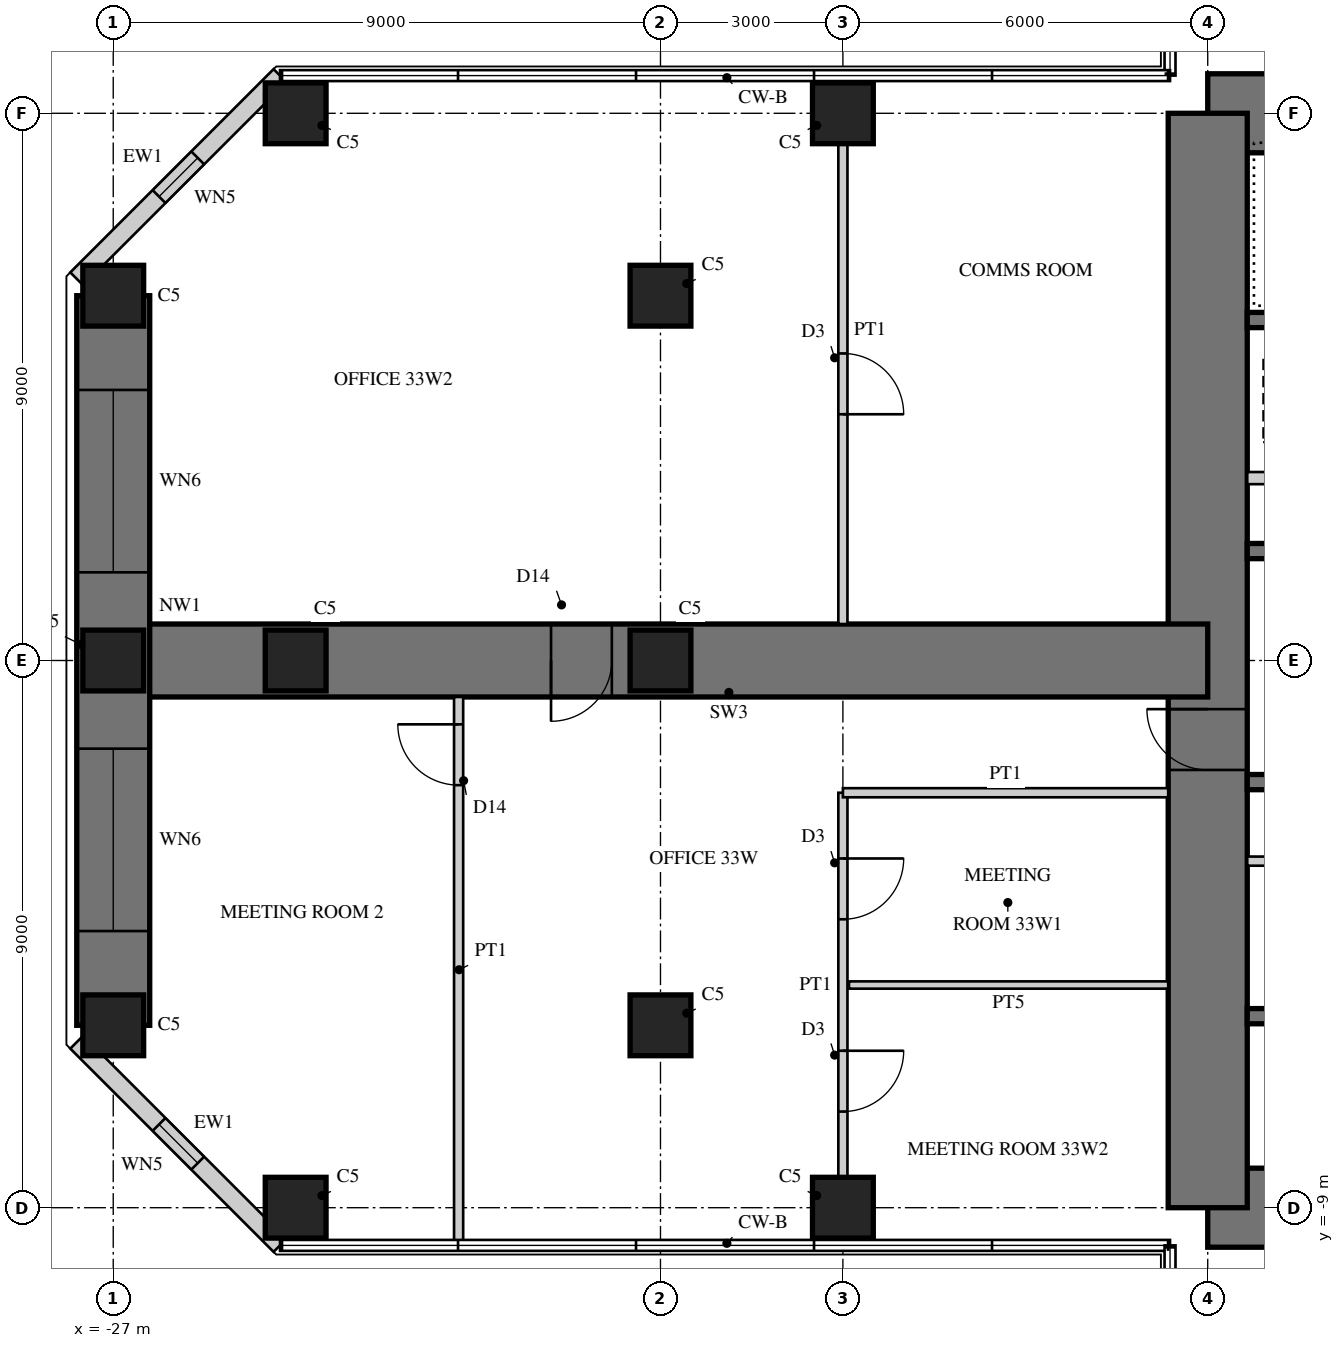
"""IFC4 building model, lengths in metres.
Left out: names, types, materials, properties, quantities, classifications, styles, units other than length and angle.
Written with IfcOpenShell. Run it as: python <this file> out.ifc"""

import sys

from ifc_helpers import new_model, si_unit, direction, frame, frame_2d, origin, origin_2d, place, context, subcontext, project, spatial, rectangle, hollow_rectangle, extrude, element, fill, save


model = new_model("IFC4")
c1 = context("Model", 3, precision=1e-05, world=origin(), true_north=direction((0.0, 1.0)))
c2 = subcontext(c1, "Body", "Model", "MODEL_VIEW")
j1 = project(units=[si_unit("LENGTHUNIT", "METRE"), si_unit("PLANEANGLEUNIT", "RADIAN")], contexts=[c1])
p1 = place(None, origin())
s1 = spatial("IfcSite", under=j1, at=p1, CompositionType="ELEMENT")
p2 = place(p1, origin())
s2 = spatial("IfcBuilding", under=s1, at=p2, CompositionType="ELEMENT")
p3 = place(p2, frame((0.0, 0.0, 136.5)))
s3 = spatial("IfcBuildingStorey", under=s2, at=p3, CompositionType="ELEMENT", Elevation=136.5)
p4 = place(p3, frame((9.0, 9.0, 0.0), z_axis=(0.0, 0.0, 1.0), x_axis=(-1.0, 0.0, 0.0)))
e1 = element("IfcWall", 1, at=p4, inside=s3, PredefinedType="SHEAR", context=c2, shape_type="SweptSolid", body=[
    extrude(rectangle(XDim=18.0, YDim=1.3, at=frame_2d((9.0, 0.0))), origin(), (0.0, 0.0, 1.0), 4.0),
])
p5 = place(p4, frame((9.8, 0.0, 0.0)))
e2 = element("IfcOpeningElement", 2, at=p5, cuts=e1, PredefinedType="OPENING", context=c2, shape_type="SweptSolid", body=[
    extrude(rectangle(XDim=1.0, YDim=2.4, at=frame_2d((0.5, 1.2))), frame((0.0, 0.66, 0.0), z_axis=(0.0, -1.0, 0.0), x_axis=(1.0, 0.0, 0.0)), (0.0, 0.0, 1.0), 1.32),
])
p6 = place(p3, frame((-9.0, -9.0, 0.0), z_axis=(0.0, 0.0, 1.0), x_axis=(1.0, 0.0, 0.0)))
e3 = element("IfcWall", 3, at=p6, inside=s3, PredefinedType="SHEAR", context=c2, shape_type="SweptSolid", body=[
    extrude(rectangle(XDim=18.0, YDim=1.3, at=frame_2d((9.0, 0.0))), origin(), (0.0, 0.0, 1.0), 4.0),
])
p7 = place(p6, frame((9.8, 0.0, 0.0)))
e4 = element("IfcOpeningElement", 4, at=p7, cuts=e3, PredefinedType="OPENING", context=c2, shape_type="SweptSolid", body=[
    extrude(rectangle(XDim=1.0, YDim=2.4, at=frame_2d((0.5, 1.2))), frame((0.0, 0.66, 0.0), z_axis=(0.0, -1.0, 0.0), x_axis=(1.0, 0.0, 0.0)), (0.0, 0.0, 1.0), 1.32),
])
p8 = place(p3, frame((-9.0, 9.0, 0.0), z_axis=(0.0, 0.0, 1.0), x_axis=(0.0, -1.0, 0.0)))
e5 = element("IfcWall", 5, at=p8, inside=s3, PredefinedType="SHEAR", context=c2, shape_type="SweptSolid", body=[
    extrude(rectangle(XDim=18.0, YDim=1.3, at=frame_2d((9.0, 0.0))), origin(), (0.0, 0.0, 1.0), 4.0),
])
p9 = place(p8, frame((9.8, 0.0, 0.0)))
e6 = element("IfcOpeningElement", 6, at=p9, cuts=e5, PredefinedType="OPENING", context=c2, shape_type="SweptSolid", body=[
    extrude(rectangle(XDim=1.0, YDim=2.4, at=frame_2d((0.5, 1.2))), frame((0.0, 0.66, 0.0), z_axis=(0.0, -1.0, 0.0), x_axis=(1.0, 0.0, 0.0)), (0.0, 0.0, 1.0), 1.32),
])
p10 = place(p3, frame((-2.125, 1.8, 0.0), z_axis=(0.0, 0.0, 1.0), x_axis=(-1.0, 0.0, 0.0)))
e7 = element("IfcWall", 7, at=p10, inside=s3, PredefinedType="SHEAR", context=c2, shape_type="SweptSolid", body=[
    extrude(rectangle(XDim=6.225, YDim=0.25, at=frame_2d((3.113, 0.0))), origin(), (0.0, 0.0, 1.0), 4.0),
])
p11 = place(p3, frame((-2.125, 5.6, 0.0), z_axis=(0.0, 0.0, 1.0), x_axis=(-1.0, 0.0, 0.0)))
e8 = element("IfcWall", 8, at=p11, inside=s3, PredefinedType="SHEAR", context=c2, shape_type="SweptSolid", body=[
    extrude(rectangle(XDim=6.225, YDim=0.25, at=frame_2d((3.113, 0.0))), origin(), (0.0, 0.0, 1.0), 4.0),
])
p12 = place(p11, frame((0.175, 0.0, 0.0)))
e9 = element("IfcOpeningElement", 9, at=p12, cuts=e8, PredefinedType="OPENING", context=c2, shape_type="SweptSolid", body=[
    extrude(rectangle(XDim=1.0, YDim=2.1, at=frame_2d((0.5, 1.05))), frame((0.0, 0.135, 0.0), z_axis=(0.0, -1.0, 0.0), x_axis=(1.0, 0.0, 0.0)), (0.0, 0.0, 1.0), 0.27),
])
p13 = place(p3, frame((-5.725, 3.0, 0.0), z_axis=(0.0, 0.0, 1.0), x_axis=(-1.0, 0.0, 0.0)))
e10 = element("IfcWall", 10, at=p13, inside=s3, PredefinedType="PARTITIONING", context=c2, shape_type="SweptSolid", body=[
    extrude(rectangle(XDim=2.625, YDim=0.2, at=frame_2d((1.312, 0.0))), origin(), (0.0, 0.0, 1.0), 4.0),
])
for number, where, z_axis, x_axis in (
    (11, (-1.925, -2.0, 0.0), (0.0, 0.0, 1.0), (-1.0, 0.0, 0.0)),
    (12, (-1.925, -5.85, 0.0), (0.0, 0.0, 1.0), (-1.0, 0.0, 0.0)),
):
    element("IfcWall", number, at=place(p3, frame(where, z_axis=z_axis, x_axis=x_axis)), inside=s3, PredefinedType="SHEAR", context=c2, shape_type="SweptSolid", body=[
        extrude(rectangle(XDim=6.425, YDim=0.25, at=frame_2d((3.212, 0.0))), origin(), (0.0, 0.0, 1.0), 4.0),
    ])
p14 = place(p3, frame((-1.925, -3.3, 0.0), z_axis=(0.0, 0.0, 1.0), x_axis=(-1.0, 0.0, 0.0)))
e13 = element("IfcWall", 13, at=p14, inside=s3, PredefinedType="PARTITIONING", context=c2, shape_type="SweptSolid", body=[
    extrude(rectangle(XDim=6.425, YDim=0.15, at=frame_2d((3.212, 0.0))), origin(), (0.0, 0.0, 1.0), 4.0),
])
p15 = place(p14, frame((0.075, 0.0, 0.0)))
e14 = element("IfcOpeningElement", 14, at=p15, cuts=e13, PredefinedType="OPENING", context=c2, shape_type="SweptSolid", body=[
    extrude(rectangle(XDim=0.8, YDim=2.1, at=frame_2d((0.4, 1.05))), frame((0.0, 0.085, 0.0), z_axis=(0.0, -1.0, 0.0), x_axis=(1.0, 0.0, 0.0)), (0.0, 0.0, 1.0), 0.17),
])
p16 = place(p14, frame((3.675, 0.0, 0.0)))
e15 = element("IfcOpeningElement", 15, at=p16, cuts=e13, PredefinedType="OPENING", context=c2, shape_type="SweptSolid", body=[
    extrude(rectangle(XDim=0.8, YDim=2.1, at=frame_2d((0.4, 1.05))), frame((0.0, 0.085, 0.0), z_axis=(0.0, -1.0, 0.0), x_axis=(1.0, 0.0, 0.0)), (0.0, 0.0, 1.0), 0.17),
])
p17 = place(p3, frame((-9.0, 0.0, 0.0), z_axis=(0.0, 0.0, 1.0), x_axis=(-1.0, 0.0, 0.0)))
e16 = element("IfcWall", 16, at=p17, inside=s3, PredefinedType="SHEAR", context=c2, shape_type="SweptSolid", body=[
    extrude(rectangle(XDim=18.0, YDim=1.2, at=frame_2d((9.0, 0.0))), origin(), (0.0, 0.0, 1.0), 4.0),
])
p18 = place(p17, frame((9.8, 0.0, 0.0)))
e17 = element("IfcOpeningElement", 17, at=p18, cuts=e16, PredefinedType="OPENING", context=c2, shape_type="SweptSolid", body=[
    extrude(rectangle(XDim=1.0, YDim=2.2, at=frame_2d((0.5, 1.1))), frame((0.0, 0.61, 0.0), z_axis=(0.0, -1.0, 0.0), x_axis=(1.0, 0.0, 0.0)), (0.0, 0.0, 1.0), 1.22),
])
p19 = place(p3, frame((-27.0, 6.0, 0.0), z_axis=(0.0, 0.0, 1.0), x_axis=(0.0, -1.0, 0.0)))
e18 = element("IfcWall", 18, at=p19, inside=s3, PredefinedType="SHEAR", context=c2, shape_type="SweptSolid", body=[
    extrude(rectangle(XDim=12.0, YDim=1.2, at=frame_2d((6.0, 0.0))), origin(), (0.0, 0.0, 1.0), 4.0),
])
p20 = place(p19, frame((1.55, 0.0, 0.6)))
e19 = element("IfcOpeningElement", 19, at=p20, cuts=e18, PredefinedType="OPENING", context=c2, shape_type="SweptSolid", body=[
    extrude(rectangle(XDim=3.0, YDim=2.4, at=frame_2d((1.5, 1.2))), frame((0.0, 0.61, 0.0), z_axis=(0.0, -1.0, 0.0), x_axis=(1.0, 0.0, 0.0)), (0.0, 0.0, 1.0), 1.22),
])
p21 = place(p19, frame((7.45, 0.0, 0.6)))
e20 = element("IfcOpeningElement", 20, at=p21, cuts=e18, PredefinedType="OPENING", context=c2, shape_type="SweptSolid", body=[
    extrude(rectangle(XDim=3.0, YDim=2.4, at=frame_2d((1.5, 1.2))), frame((0.0, 0.61, 0.0), z_axis=(0.0, -1.0, 0.0), x_axis=(1.0, 0.0, 0.0)), (0.0, 0.0, 1.0), 1.22),
])
for number, where, z_axis, x_axis in (
    (21, (-15.0, 9.0, 0.0), (0.0, 0.0, 1.0), (1.0, 0.0, 0.0)),
    (22, (-24.0, 9.0, 0.0), (0.0, 0.0, 1.0), (1.0, 0.0, 0.0)),
    (23, (-15.0, -9.0, 0.0), (0.0, 0.0, 1.0), (1.0, 0.0, 0.0)),
    (24, (-24.0, -9.0, 0.0), (0.0, 0.0, 1.0), (1.0, 0.0, 0.0)),
    (25, (-27.0, 6.0, 0.0), (0.0, 0.0, 1.0), (1.0, 0.0, 0.0)),
    (26, (-27.0, 0.0, 0.0), (0.0, 0.0, 1.0), (1.0, 0.0, 0.0)),
    (27, (-27.0, -6.0, 0.0), (0.0, 0.0, 1.0), (1.0, 0.0, 0.0)),
    (28, (-18.0, 6.0, 0.0), (0.0, 0.0, 1.0), (1.0, 0.0, 0.0)),
    (29, (-18.0, 0.0, 0.0), (0.0, 0.0, 1.0), (1.0, 0.0, 0.0)),
    (30, (-18.0, -6.0, 0.0), (0.0, 0.0, 1.0), (1.0, 0.0, 0.0)),
    (31, (-24.0, 0.0, 0.0), (0.0, 0.0, 1.0), (1.0, 0.0, 0.0)),
):
    element("IfcColumn", number, at=place(p3, frame(where, z_axis=z_axis, x_axis=x_axis)), inside=s3, PredefinedType="COLUMN", context=c2, shape_type="SweptSolid", body=[
        extrude(rectangle(XDim=1.0, YDim=1.0, at=origin_2d()), origin(), (0.0, 0.0, 1.0), 4.0),
    ])
p22 = place(p3, frame((-24.257, 9.62, 0.0), z_axis=(0.0, 0.0, 1.0), x_axis=(-0.707106781187, -0.707106781187, 0.0)))
e32 = element("IfcWall", 32, at=p22, inside=s3, PredefinedType="SOLIDWALL", context=c2, shape_type="SweptSolid", body=[
    extrude(rectangle(XDim=4.728, YDim=0.3, at=frame_2d((2.364, 0.0))), origin(), (0.0, 0.0, 1.0), 3.8),
])
p23 = place(p22, frame((1.914, 0.0, 0.3)))
e33 = element("IfcOpeningElement", 33, at=p23, cuts=e32, PredefinedType="OPENING", context=c2, shape_type="SweptSolid", body=[
    extrude(rectangle(XDim=0.9, YDim=2.4, at=frame_2d((0.45, 1.2))), frame((0.0, 0.16, 0.0), z_axis=(0.0, -1.0, 0.0), x_axis=(1.0, 0.0, 0.0)), (0.0, 0.0, 1.0), 0.32),
])
p24 = place(p3, frame((-27.6, -6.277, 0.0), z_axis=(0.0, 0.0, 1.0), x_axis=(0.707106781187, -0.707106781187, 0.0)))
e34 = element("IfcWall", 34, at=p24, inside=s3, PredefinedType="SOLIDWALL", context=c2, shape_type="SweptSolid", body=[
    extrude(rectangle(XDim=4.728, YDim=0.3, at=frame_2d((2.364, 0.0))), origin(), (0.0, 0.0, 1.0), 3.8),
])
p25 = place(p24, frame((1.914, 0.0, 0.3)))
e35 = element("IfcOpeningElement", 35, at=p25, cuts=e34, PredefinedType="OPENING", context=c2, shape_type="SweptSolid", body=[
    extrude(rectangle(XDim=0.9, YDim=2.4, at=frame_2d((0.45, 1.2))), frame((0.0, 0.16, 0.0), z_axis=(0.0, -1.0, 0.0), x_axis=(1.0, 0.0, 0.0)), (0.0, 0.0, 1.0), 0.32),
])
p26 = place(p3, frame((-15.0, -2.175, 0.0), z_axis=(0.0, 0.0, 1.0), x_axis=(0.0, -1.0, 0.0)))
e36 = element("IfcWall", 36, at=p26, inside=s3, PredefinedType="PARTITIONING", context=c2, shape_type="SweptSolid", body=[
    extrude(rectangle(XDim=6.325, YDim=0.15, at=frame_2d((3.163, 0.0))), origin(), (0.0, 0.0, 1.0), 3.0),
])
p27 = place(p26, frame((1.081, 0.0, 0.0)))
e37 = element("IfcOpeningElement", 37, at=p27, cuts=e36, PredefinedType="OPENING", context=c2, shape_type="SweptSolid", body=[
    extrude(rectangle(XDim=1.0, YDim=2.1, at=frame_2d((0.5, 1.05))), frame((0.0, 0.085, 0.0), z_axis=(0.0, -1.0, 0.0), x_axis=(1.0, 0.0, 0.0)), (0.0, 0.0, 1.0), 0.17),
])
p28 = place(p26, frame((4.244, 0.0, 0.0)))
e38 = element("IfcOpeningElement", 38, at=p28, cuts=e36, PredefinedType="OPENING", context=c2, shape_type="SweptSolid", body=[
    extrude(rectangle(XDim=1.0, YDim=2.1, at=frame_2d((0.5, 1.05))), frame((0.0, 0.085, 0.0), z_axis=(0.0, -1.0, 0.0), x_axis=(1.0, 0.0, 0.0)), (0.0, 0.0, 1.0), 0.17),
])
p29 = place(p3, frame((-9.65, -2.175, 0.0), z_axis=(0.0, 0.0, 1.0), x_axis=(-1.0, 0.0, 0.0)))
e39 = element("IfcWall", 39, at=p29, inside=s3, PredefinedType="PARTITIONING", context=c2, shape_type="SweptSolid", body=[
    extrude(rectangle(XDim=5.35, YDim=0.15, at=frame_2d((2.675, 0.0))), origin(), (0.0, 0.0, 1.0), 3.8),
])
p30 = place(p3, frame((-9.65, -5.337, 0.0), z_axis=(0.0, 0.0, 1.0), x_axis=(-1.0, 0.0, 0.0)))
e40 = element("IfcWall", 40, at=p30, inside=s3, PredefinedType="PLUMBINGWALL", context=c2, shape_type="SweptSolid", body=[
    extrude(rectangle(XDim=5.25, YDim=0.12, at=frame_2d((2.625, 0.0))), origin(), (0.0, 0.0, 1.0), 3.8),
])
p31 = place(p3, frame((-15.0, 8.5, 0.0), z_axis=(0.0, 0.0, 1.0), x_axis=(0.0, -1.0, 0.0)))
e41 = element("IfcWall", 41, at=p31, inside=s3, PredefinedType="PARTITIONING", context=c2, shape_type="SweptSolid", body=[
    extrude(rectangle(XDim=7.9, YDim=0.15, at=frame_2d((3.95, 0.0))), origin(), (0.0, 0.0, 1.0), 3.0),
])
p32 = place(p31, frame((3.45, 0.0, 0.0)))
e42 = element("IfcOpeningElement", 42, at=p32, cuts=e41, PredefinedType="OPENING", context=c2, shape_type="SweptSolid", body=[
    extrude(rectangle(XDim=1.0, YDim=2.1, at=frame_2d((0.5, 1.05))), frame((0.0, 0.085, 0.0), z_axis=(0.0, -1.0, 0.0), x_axis=(1.0, 0.0, 0.0)), (0.0, 0.0, 1.0), 0.17),
])
p33 = place(p3, frame((-21.32, -0.6, 0.0), z_axis=(0.0, 0.0, 1.0), x_axis=(0.0, -1.0, 0.0)))
e43 = element("IfcWall", 43, at=p33, inside=s3, PredefinedType="PARTITIONING", context=c2, shape_type="SweptSolid", body=[
    extrude(rectangle(XDim=8.98, YDim=0.15, at=frame_2d((4.49, 0.0))), origin(), (0.0, 0.0, 1.0), 3.8),
])
p34 = place(p33, frame((0.45, 0.0, 0.0)))
e44 = element("IfcOpeningElement", 44, at=p34, cuts=e43, PredefinedType="OPENING", context=c2, shape_type="SweptSolid", body=[
    extrude(rectangle(XDim=1.0, YDim=2.2, at=frame_2d((0.5, 1.1))), frame((0.0, 0.085, 0.0), z_axis=(0.0, -1.0, 0.0), x_axis=(1.0, 0.0, 0.0)), (0.0, 0.0, 1.0), 0.17),
])
p35 = place(p23, origin())
e45 = element("IfcWindow", 45, at=p35, inside=s3, PartitioningType="SINGLE_PANEL", PredefinedType="WINDOW", context=c2, shape_type="SweptSolid", body=[
    extrude(hollow_rectangle(XDim=0.9, YDim=2.4, WallThickness=0.06, at=frame_2d((0.45, 1.2))), frame((0.0, 0.03, 0.0), z_axis=(0.0, -1.0, 0.0), x_axis=(1.0, 0.0, 0.0)), (0.0, 0.0, 1.0), 0.06),
    extrude(rectangle(XDim=0.779, YDim=2.279, at=frame_2d((0.45, 1.2))), frame((0.0, 0.03, 0.0), z_axis=(0.0, -1.0, 0.0), x_axis=(1.0, 0.0, 0.0)), (0.0, 0.0, 1.0), 0.06),
])
fill(e33, e45)
p36 = place(p20, origin())
e46 = element("IfcWindow", 46, at=p36, inside=s3, PartitioningType="SINGLE_PANEL", PredefinedType="WINDOW", context=c2, shape_type="SweptSolid", body=[
    extrude(hollow_rectangle(XDim=3.0, YDim=2.4, WallThickness=0.06, at=frame_2d((1.5, 1.2))), frame((0.0, 0.03, 0.0), z_axis=(0.0, -1.0, 0.0), x_axis=(1.0, 0.0, 0.0)), (0.0, 0.0, 1.0), 0.06),
    extrude(rectangle(XDim=2.879, YDim=2.279, at=frame_2d((1.5, 1.2))), frame((0.0, 0.03, 0.0), z_axis=(0.0, -1.0, 0.0), x_axis=(1.0, 0.0, 0.0)), (0.0, 0.0, 1.0), 0.06),
])
fill(e19, e46)
p37 = place(p21, origin())
e47 = element("IfcWindow", 47, at=p37, inside=s3, PartitioningType="SINGLE_PANEL", PredefinedType="WINDOW", context=c2, shape_type="SweptSolid", body=[
    extrude(hollow_rectangle(XDim=3.0, YDim=2.4, WallThickness=0.06, at=frame_2d((1.5, 1.2))), frame((0.0, 0.03, 0.0), z_axis=(0.0, -1.0, 0.0), x_axis=(1.0, 0.0, 0.0)), (0.0, 0.0, 1.0), 0.06),
    extrude(rectangle(XDim=2.879, YDim=2.279, at=frame_2d((1.5, 1.2))), frame((0.0, 0.03, 0.0), z_axis=(0.0, -1.0, 0.0), x_axis=(1.0, 0.0, 0.0)), (0.0, 0.0, 1.0), 0.06),
])
fill(e20, e47)
p38 = place(p25, origin())
e48 = element("IfcWindow", 48, at=p38, inside=s3, PartitioningType="SINGLE_PANEL", PredefinedType="WINDOW", context=c2, shape_type="SweptSolid", body=[
    extrude(hollow_rectangle(XDim=0.9, YDim=2.4, WallThickness=0.06, at=frame_2d((0.45, 1.2))), frame((0.0, 0.03, 0.0), z_axis=(0.0, -1.0, 0.0), x_axis=(1.0, 0.0, 0.0)), (0.0, 0.0, 1.0), 0.06),
    extrude(rectangle(XDim=0.779, YDim=2.279, at=frame_2d((0.45, 1.2))), frame((0.0, 0.03, 0.0), z_axis=(0.0, -1.0, 0.0), x_axis=(1.0, 0.0, 0.0)), (0.0, 0.0, 1.0), 0.06),
])
fill(e35, e48)
p39 = place(p27, origin())
e49 = element("IfcDoor", 49, at=p39, inside=s3, OperationType="SINGLE_SWING_LEFT", PredefinedType="DOOR", context=c2, shape_type="SweptSolid", body=[
    extrude(rectangle(XDim=1.0, YDim=2.1, at=frame_2d((0.5, 1.05))), frame((0.0, 0.025, 0.0), z_axis=(0.0, -1.0, 0.0), x_axis=(1.0, 0.0, 0.0)), (0.0, 0.0, 1.0), 0.05),
])
fill(e37, e49)
p40 = place(p28, origin())
e50 = element("IfcDoor", 50, at=p40, inside=s3, OperationType="SINGLE_SWING_LEFT", PredefinedType="DOOR", context=c2, shape_type="SweptSolid", body=[
    extrude(rectangle(XDim=1.0, YDim=2.1, at=frame_2d((0.5, 1.05))), frame((0.0, 0.025, 0.0), z_axis=(0.0, -1.0, 0.0), x_axis=(1.0, 0.0, 0.0)), (0.0, 0.0, 1.0), 0.05),
])
fill(e38, e50)
p41 = place(p32, origin())
e51 = element("IfcDoor", 51, at=p41, inside=s3, OperationType="SINGLE_SWING_RIGHT", PredefinedType="DOOR", context=c2, shape_type="SweptSolid", body=[
    extrude(rectangle(XDim=1.0, YDim=2.1, at=frame_2d((0.5, 1.05))), frame((0.0, 0.025, 0.0), z_axis=(0.0, -1.0, 0.0), x_axis=(1.0, 0.0, 0.0)), (0.0, 0.0, 1.0), 0.05),
])
fill(e42, e51)
p42 = place(p34, frame((1.0, 0.0, 0.0), z_axis=(0.0, 0.0, 1.0), x_axis=(-1.0, 0.0, 0.0)))
e52 = element("IfcDoor", 52, at=p42, inside=s3, OperationType="SINGLE_SWING_RIGHT", PredefinedType="DOOR", context=c2, shape_type="SweptSolid", body=[
    extrude(rectangle(XDim=1.0, YDim=2.2, at=frame_2d((0.5, 1.1))), frame((0.0, 0.025, 0.0), z_axis=(0.0, -1.0, 0.0), x_axis=(1.0, 0.0, 0.0)), (0.0, 0.0, 1.0), 0.05),
])
fill(e44, e52)
p43 = place(p18, origin())
e53 = element("IfcDoor", 53, at=p43, inside=s3, OperationType="SINGLE_SWING_RIGHT", PredefinedType="DOOR", context=c2, shape_type="SweptSolid", body=[
    extrude(rectangle(XDim=1.0, YDim=2.2, at=frame_2d((0.5, 1.1))), frame((0.0, 0.025, 0.0), z_axis=(0.0, -1.0, 0.0), x_axis=(1.0, 0.0, 0.0)), (0.0, 0.0, 1.0), 0.05),
])
fill(e17, e53)
p44 = place(p9, frame((1.0, 0.0, 0.0), z_axis=(0.0, 0.0, 1.0), x_axis=(-1.0, 0.0, 0.0)))
e54 = element("IfcDoor", 54, at=p44, inside=s3, OperationType="SINGLE_SWING_RIGHT", PredefinedType="DOOR", context=c2, shape_type="SweptSolid", body=[
    extrude(rectangle(XDim=1.0, YDim=2.4, at=frame_2d((0.5, 1.2))), frame((0.0, -0.005, 0.0), z_axis=(0.0, -1.0, 0.0), x_axis=(1.0, 0.0, 0.0)), (0.0, 0.0, 1.0), 0.05),
])
fill(e6, e54)
save(model, sys.argv[1])
